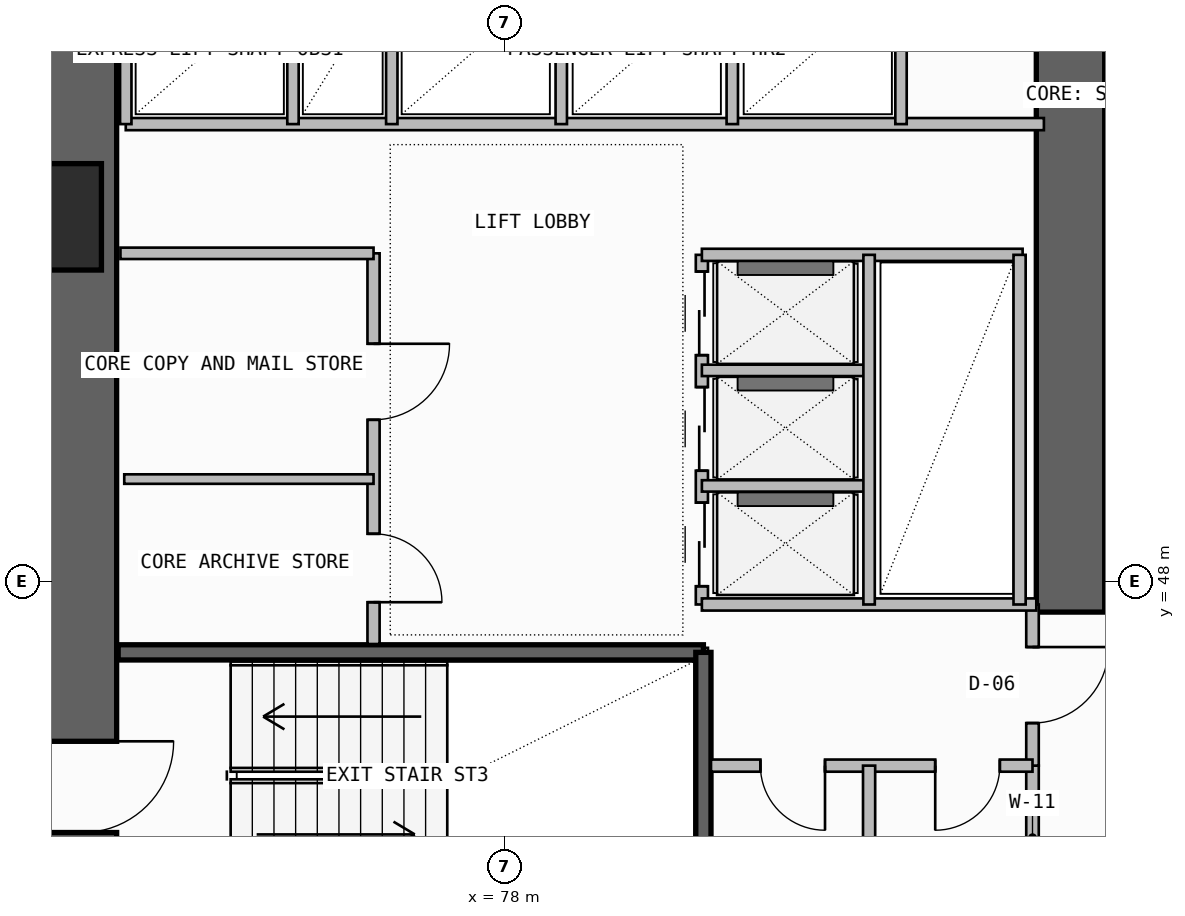
"""IFC4 building model, lengths in metres.
Left out: names, types, materials, properties, quantities, classifications, styles, units other than length and angle.
Written with IfcOpenShell. Run it as: python <this file> out.ifc"""

import sys

from ifc_helpers import new_model, si_unit, direction, frame, frame_2d, origin, origin_2d, place, context, subcontext, project, spatial, rectangle, extrude, element, fill, save


model = new_model("IFC4")
c1 = context("Model", 3, precision=1e-05, world=origin(), true_north=direction((0.0, 1.0)))
c2 = subcontext(c1, "Body", "Model", "MODEL_VIEW")
j1 = project(units=[si_unit("LENGTHUNIT", "METRE"), si_unit("PLANEANGLEUNIT", "RADIAN")], contexts=[c1])
p1 = place(None, origin())
s1 = spatial("IfcSite", under=j1, at=p1, CompositionType="ELEMENT")
p2 = place(p1, origin())
s2 = spatial("IfcBuilding", under=s1, at=p2, CompositionType="ELEMENT")
p3 = place(p2, frame((0.0, 0.0, 99.3)))
s3 = spatial("IfcBuildingStorey", under=s2, at=p3, CompositionType="ELEMENT", Elevation=99.3)
p4 = place(p3, frame((72.45, 43.35, -0.26), z_axis=(0.0, 0.0, 1.0), x_axis=(0.0, 1.0, 0.0)))
e1 = element("IfcWall", 1, at=p4, inside=s3, PredefinedType="SHEAR", context=c2, shape_type="SweptSolid", body=[
    extrude(rectangle(XDim=12.7, YDim=0.9, at=frame_2d((6.35, 0.0))), origin(), (0.0, 0.0, 1.0), 3.6),
])
p5 = place(p4, frame((1.35, 0.0, 0.26)))
e2 = element("IfcOpeningElement", 2, at=p5, cuts=e1, PredefinedType="OPENING", context=c2, shape_type="SweptSolid", body=[
    extrude(rectangle(XDim=1.2, YDim=2.2, at=frame_2d((0.6, 1.1))), frame((0.0, 0.46, 0.0), z_axis=(0.0, -1.0, 0.0), x_axis=(1.0, 0.0, 0.0)), (0.0, 0.0, 1.0), 0.92),
])
p6 = place(p3, frame((85.45, 47.6, -0.26), z_axis=(0.0, 0.0, 1.0), x_axis=(0.0, 1.0, 0.0)))
e3 = element("IfcWall", 3, at=p6, inside=s3, PredefinedType="SHEAR", context=c2, shape_type="SweptSolid", body=[
    extrude(rectangle(XDim=8.45, YDim=0.9, at=frame_2d((4.225, 0.0))), origin(), (0.0, 0.0, 1.0), 3.6),
])
p7 = place(p3, frame((72.0, 52.8, 0.0), z_axis=(0.0, 0.0, 1.0), x_axis=(1.0, 0.0, 0.0)))
e4 = element("IfcColumn", 4, at=p7, inside=s3, PredefinedType="COLUMN", context=c2, shape_type="SweptSolid", body=[
    extrude(rectangle(XDim=1.4, YDim=1.4, at=origin_2d()), origin(), (0.0, 0.0, 1.0), 3.6),
])
p8 = place(p3, frame((72.92, 47.07, -0.26), z_axis=(0.0, 0.0, 1.0), x_axis=(1.0, 0.0, 0.0)))
e5 = element("IfcWall", 5, at=p8, inside=s3, PredefinedType="SOLIDWALL", context=c2, shape_type="SweptSolid", body=[
    extrude(rectangle(XDim=7.7, YDim=0.2, at=frame_2d((3.85, 0.0))), origin(), (0.0, 0.0, 1.0), 3.6),
])
p9 = place(p3, frame((80.62, 43.83, -0.26), z_axis=(0.0, 0.0, 1.0), x_axis=(0.0, 1.0, 0.0)))
e6 = element("IfcWall", 6, at=p9, inside=s3, PredefinedType="SOLIDWALL", context=c2, shape_type="SweptSolid", body=[
    extrude(rectangle(XDim=3.24, YDim=0.2, at=frame_2d((1.62, 0.0))), origin(), (0.0, 0.0, 1.0), 3.6),
])
p10 = place(p3, frame((84.95, 43.68, 0.0), z_axis=(0.0, 0.0, 1.0), x_axis=(0.0, 1.0, 0.0)))
e7 = element("IfcWall", 7, at=p10, inside=s3, PredefinedType="PLUMBINGWALL", context=c2, shape_type="SweptSolid", body=[
    extrude(rectangle(XDim=1.9, YDim=0.165, at=frame_2d((0.95, 0.0))), origin(), (0.0, 0.0, 1.0), 3.34),
])
p11 = place(p3, frame((84.95, 45.58, 0.0), z_axis=(0.0, 0.0, 1.0), x_axis=(0.0, 1.0, 0.0)))
e8 = element("IfcWall", 8, at=p11, inside=s3, PredefinedType="PARTITIONING", context=c2, shape_type="SweptSolid", body=[
    extrude(rectangle(XDim=2.12, YDim=0.165, at=frame_2d((1.06, 0.0))), origin(), (0.0, 0.0, 1.0), 3.34),
])
p12 = place(p11, frame((0.56, 0.0, 0.0)))
e9 = element("IfcOpeningElement", 9, at=p12, cuts=e8, PredefinedType="OPENING", context=c2, shape_type="SweptSolid", body=[
    extrude(rectangle(XDim=1.0, YDim=2.2, at=frame_2d((0.5, 1.1))), frame((0.0, 0.093, 0.0), z_axis=(0.0, -1.0, 0.0), x_axis=(1.0, 0.0, 0.0)), (0.0, 0.0, 1.0), 0.185),
])
p13 = place(p3, frame((80.72, 45.58, 0.0), z_axis=(0.0, 0.0, 1.0), x_axis=(1.0, 0.0, 0.0)))
e10 = element("IfcWall", 10, at=p13, inside=s3, PredefinedType="PLUMBINGWALL", context=c2, shape_type="SweptSolid", body=[
    extrude(rectangle(XDim=4.23, YDim=0.16, at=frame_2d((2.115, 0.0))), origin(), (0.0, 0.0, 1.0), 3.34),
])
p14 = place(p13, frame((0.65, 0.0, 0.0)))
e11 = element("IfcOpeningElement", 11, at=p14, cuts=e10, PredefinedType="OPENING", context=c2, shape_type="SweptSolid", body=[
    extrude(rectangle(XDim=0.85, YDim=2.05, at=frame_2d((0.425, 1.025))), frame((0.0, 0.09, 0.0), z_axis=(0.0, -1.0, 0.0), x_axis=(1.0, 0.0, 0.0)), (0.0, 0.0, 1.0), 0.18),
])
p15 = place(p13, frame((2.95, 0.0, 0.0)))
e12 = element("IfcOpeningElement", 12, at=p15, cuts=e10, PredefinedType="OPENING", context=c2, shape_type="SweptSolid", body=[
    extrude(rectangle(XDim=0.85, YDim=2.05, at=frame_2d((0.425, 1.025))), frame((0.0, 0.09, 0.0), z_axis=(0.0, -1.0, 0.0), x_axis=(1.0, 0.0, 0.0)), (0.0, 0.0, 1.0), 0.18),
])
p16 = place(p3, frame((82.8, 43.68, 0.0), z_axis=(0.0, 0.0, 1.0), x_axis=(0.0, 1.0, 0.0)))
e13 = element("IfcWall", 13, at=p16, inside=s3, PredefinedType="PLUMBINGWALL", context=c2, shape_type="SweptSolid", body=[
    extrude(rectangle(XDim=1.9, YDim=0.16, at=frame_2d((0.95, 0.0))), origin(), (0.0, 0.0, 1.0), 3.34),
])
p17 = place(p3, frame((76.28, 47.18, 0.0), z_axis=(0.0, 0.0, 1.0), x_axis=(0.0, 1.0, 0.0)))
e14 = element("IfcWall", 14, at=p17, inside=s3, PredefinedType="SOLIDWALL", context=c2, shape_type="SweptSolid", body=[
    extrude(rectangle(XDim=5.14, YDim=0.16, at=frame_2d((2.57, 0.0))), origin(), (0.0, 0.0, 1.0), 3.34),
])
p18 = place(p17, frame((0.55, 0.0, 0.0)))
e15 = element("IfcOpeningElement", 15, at=p18, cuts=e14, PredefinedType="OPENING", context=c2, shape_type="SweptSolid", body=[
    extrude(rectangle(XDim=0.9, YDim=2.1, at=frame_2d((0.45, 1.05))), frame((0.0, 0.09, 0.0), z_axis=(0.0, -1.0, 0.0), x_axis=(1.0, 0.0, 0.0)), (0.0, 0.0, 1.0), 0.18),
])
p19 = place(p17, frame((2.95, 0.0, 0.0)))
e16 = element("IfcOpeningElement", 16, at=p19, cuts=e14, PredefinedType="OPENING", context=c2, shape_type="SweptSolid", body=[
    extrude(rectangle(XDim=1.0, YDim=2.2, at=frame_2d((0.5, 1.1))), frame((0.0, 0.09, 0.0), z_axis=(0.0, -1.0, 0.0), x_axis=(1.0, 0.0, 0.0)), (0.0, 0.0, 1.0), 0.18),
])
p20 = place(p3, frame((72.95, 52.32, 0.0), z_axis=(0.0, 0.0, 1.0), x_axis=(1.0, 0.0, 0.0)))
e17 = element("IfcWall", 17, at=p20, inside=s3, PredefinedType="SOLIDWALL", context=c2, shape_type="SweptSolid", body=[
    extrude(rectangle(XDim=3.33, YDim=0.15, at=frame_2d((1.665, 0.0))), origin(), (0.0, 0.0, 1.0), 3.34),
])
p21 = place(p3, frame((73.0, 49.35, 0.0), z_axis=(0.0, 0.0, 1.0), x_axis=(1.0, 0.0, 0.0)))
e18 = element("IfcWall", 18, at=p21, inside=s3, PredefinedType="PARTITIONING", context=c2, shape_type="SweptSolid", body=[
    extrude(rectangle(XDim=3.28, YDim=0.125, at=frame_2d((1.64, 0.0))), origin(), (0.0, 0.0, 1.0), 3.34),
])
p22 = place(p3, frame((80.6, 47.7, 0.0), z_axis=(0.0, 0.0, 1.0), x_axis=(0.0, 1.0, 0.0)))
e19 = element("IfcWall", 19, at=p22, inside=s3, PredefinedType="SOLIDWALL", context=c2, shape_type="SweptSolid", body=[
    extrude(rectangle(XDim=4.6, YDim=0.16, at=frame_2d((2.3, 0.0))), origin(), (0.0, 0.0, 1.0), 3.34),
])
p23 = place(p22, frame((0.24, 0.0, 0.0)))
e20 = element("IfcOpeningElement", 20, at=p23, cuts=e19, PredefinedType="OPENING", context=c2, shape_type="SweptSolid", body=[
    extrude(rectangle(XDim=1.1, YDim=2.25, at=frame_2d((0.55, 1.125))), frame((0.0, 0.09, 0.0), z_axis=(0.0, -1.0, 0.0), x_axis=(1.0, 0.0, 0.0)), (0.0, 0.0, 1.0), 0.18),
])
p24 = place(p22, frame((1.76, 0.0, 0.0)))
e21 = element("IfcOpeningElement", 21, at=p24, cuts=e19, PredefinedType="OPENING", context=c2, shape_type="SweptSolid", body=[
    extrude(rectangle(XDim=1.1, YDim=2.25, at=frame_2d((0.55, 1.125))), frame((0.0, 0.09, 0.0), z_axis=(0.0, -1.0, 0.0), x_axis=(1.0, 0.0, 0.0)), (0.0, 0.0, 1.0), 0.18),
])
p25 = place(p22, frame((3.28, 0.0, 0.0)))
e22 = element("IfcOpeningElement", 22, at=p25, cuts=e19, PredefinedType="OPENING", context=c2, shape_type="SweptSolid", body=[
    extrude(rectangle(XDim=1.1, YDim=2.25, at=frame_2d((0.55, 1.125))), frame((0.0, 0.09, 0.0), z_axis=(0.0, -1.0, 0.0), x_axis=(1.0, 0.0, 0.0)), (0.0, 0.0, 1.0), 0.18),
])
p26 = place(p3, frame((80.6, 47.7, 0.0), z_axis=(0.0, 0.0, 1.0), x_axis=(1.0, 0.0, 0.0)))
e23 = element("IfcWall", 23, at=p26, inside=s3, PredefinedType="SOLIDWALL", context=c2, shape_type="SweptSolid", body=[
    extrude(rectangle(XDim=4.4, YDim=0.16, at=frame_2d((2.2, 0.0))), origin(), (0.0, 0.0, 1.0), 3.34),
])
p27 = place(p3, frame((80.6, 52.3, 0.0), z_axis=(0.0, 0.0, 1.0), x_axis=(1.0, 0.0, 0.0)))
e24 = element("IfcWall", 24, at=p27, inside=s3, PredefinedType="SOLIDWALL", context=c2, shape_type="SweptSolid", body=[
    extrude(rectangle(XDim=4.22, YDim=0.16, at=frame_2d((2.11, 0.0))), origin(), (0.0, 0.0, 1.0), 3.34),
])
for number, where, z_axis, x_axis in (
    (25, (80.6, 49.26, 0.0), (0.0, 0.0, 1.0), (1.0, 0.0, 0.0)),
    (26, (80.6, 50.78, 0.0), (0.0, 0.0, 1.0), (1.0, 0.0, 0.0)),
):
    element("IfcWall", number, at=place(p3, frame(where, z_axis=z_axis, x_axis=x_axis)), inside=s3, PredefinedType="PLUMBINGWALL", context=c2, shape_type="SweptSolid", body=[
        extrude(rectangle(XDim=2.2, YDim=0.15, at=frame_2d((1.1, 0.0))), origin(), (0.0, 0.0, 1.0), 3.34),
    ])
p28 = place(p3, frame((82.8, 47.7, 0.0), z_axis=(0.0, 0.0, 1.0), x_axis=(0.0, 1.0, 0.0)))
e27 = element("IfcWall", 27, at=p28, inside=s3, PredefinedType="PLUMBINGWALL", context=c2, shape_type="SweptSolid", body=[
    extrude(rectangle(XDim=4.6, YDim=0.15, at=frame_2d((2.3, 0.0))), origin(), (0.0, 0.0, 1.0), 3.34),
])
p29 = place(p3, frame((84.78, 47.7, 0.0), z_axis=(0.0, 0.0, 1.0), x_axis=(0.0, 1.0, 0.0)))
e28 = element("IfcWall", 28, at=p29, inside=s3, PredefinedType="SOLIDWALL", context=c2, shape_type="SweptSolid", body=[
    extrude(rectangle(XDim=4.6, YDim=0.16, at=frame_2d((2.3, 0.0))), origin(), (0.0, 0.0, 1.0), 3.34),
])
p30 = place(p3, frame((73.02, 54.02, 0.0), z_axis=(0.0, 0.0, 1.0), x_axis=(1.0, 0.0, 0.0)))
e29 = element("IfcWall", 29, at=p30, inside=s3, PredefinedType="SOLIDWALL", context=c2, shape_type="SweptSolid", body=[
    extrude(rectangle(XDim=12.08, YDim=0.16, at=frame_2d((6.04, 0.0))), origin(), (0.0, 0.0, 1.0), 3.34),
])
p31 = place(p3, frame((73.02, 54.02, 0.0), z_axis=(0.0, 0.0, 1.0), x_axis=(0.0, 1.0, 0.0)))
e30 = element("IfcWall", 30, at=p31, inside=s3, PredefinedType="PLUMBINGWALL", context=c2, shape_type="SweptSolid", body=[
    extrude(rectangle(XDim=1.94, YDim=0.15, at=frame_2d((0.97, 0.0))), origin(), (0.0, 0.0, 1.0), 3.34),
])
p32 = place(p3, frame((76.52, 54.02, 0.0), z_axis=(0.0, 0.0, 1.0), x_axis=(0.0, 1.0, 0.0)))
e31 = element("IfcWall", 31, at=p32, inside=s3, PredefinedType="SOLIDWALL", context=c2, shape_type="SweptSolid", body=[
    extrude(rectangle(XDim=1.94, YDim=0.15, at=frame_2d((0.97, 0.0))), origin(), (0.0, 0.0, 1.0), 3.34),
])
p33 = place(p3, frame((75.22, 54.02, 0.0), z_axis=(0.0, 0.0, 1.0), x_axis=(0.0, 1.0, 0.0)))
e32 = element("IfcWall", 32, at=p33, inside=s3, PredefinedType="PLUMBINGWALL", context=c2, shape_type="SweptSolid", body=[
    extrude(rectangle(XDim=1.94, YDim=0.15, at=frame_2d((0.97, 0.0))), origin(), (0.0, 0.0, 1.0), 3.34),
])
for number, where, z_axis, x_axis in (
    (33, (78.75, 54.02, 0.0), (0.0, 0.0, 1.0), (0.0, 1.0, 0.0)),
    (34, (81.0, 54.02, 0.0), (0.0, 0.0, 1.0), (0.0, 1.0, 0.0)),
):
    element("IfcWall", number, at=place(p3, frame(where, z_axis=z_axis, x_axis=x_axis)), inside=s3, PredefinedType="PLUMBINGWALL", context=c2, shape_type="SweptSolid", body=[
        extrude(rectangle(XDim=1.96, YDim=0.15, at=frame_2d((0.98, 0.0))), origin(), (0.0, 0.0, 1.0), 3.34),
    ])
p34 = place(p3, frame((83.22, 54.02, 0.0), z_axis=(0.0, 0.0, 1.0), x_axis=(0.0, 1.0, 0.0)))
e35 = element("IfcWall", 35, at=p34, inside=s3, PredefinedType="SOLIDWALL", context=c2, shape_type="SweptSolid", body=[
    extrude(rectangle(XDim=1.96, YDim=0.15, at=frame_2d((0.98, 0.0))), origin(), (0.0, 0.0, 1.0), 3.34),
])
p35 = place(p5, frame((1.2, 0.0, 0.0), z_axis=(0.0, 0.0, 1.0), x_axis=(-1.0, 0.0, 0.0)))
e36 = element("IfcDoor", 36, at=p35, inside=s3, OperationType="SINGLE_SWING_LEFT", PredefinedType="USERDEFINED", context=c2, shape_type="SweptSolid", body=[
    extrude(rectangle(XDim=1.2, YDim=2.2, at=frame_2d((0.6, 1.1))), frame((0.0, 0.025, 0.0), z_axis=(0.0, -1.0, 0.0), x_axis=(1.0, 0.0, 0.0)), (0.0, 0.0, 1.0), 0.05),
])
fill(e2, e36)
p36 = place(p12, frame((1.0, 0.0, 0.0), z_axis=(0.0, 0.0, 1.0), x_axis=(-1.0, 0.0, 0.0)))
e37 = element("IfcDoor", 37, at=p36, inside=s3, OperationType="SINGLE_SWING_LEFT", PredefinedType="DOOR", context=c2, shape_type="SweptSolid", body=[
    extrude(rectangle(XDim=1.0, YDim=2.2, at=frame_2d((0.5, 1.1))), frame((0.0, 0.025, 0.0), z_axis=(0.0, -1.0, 0.0), x_axis=(1.0, 0.0, 0.0)), (0.0, 0.0, 1.0), 0.05),
])
fill(e9, e37)
p37 = place(p14, frame((0.85, 0.0, 0.0), z_axis=(0.0, 0.0, 1.0), x_axis=(-1.0, 0.0, 0.0)))
e38 = element("IfcDoor", 38, at=p37, inside=s3, OperationType="SINGLE_SWING_LEFT", PredefinedType="DOOR", context=c2, shape_type="SweptSolid", body=[
    extrude(rectangle(XDim=0.85, YDim=2.05, at=frame_2d((0.425, 1.025))), frame((0.0, 0.025, 0.0), z_axis=(0.0, -1.0, 0.0), x_axis=(1.0, 0.0, 0.0)), (0.0, 0.0, 1.0), 0.05),
])
fill(e11, e38)
p38 = place(p15, frame((0.85, 0.0, 0.0), z_axis=(0.0, 0.0, 1.0), x_axis=(-1.0, 0.0, 0.0)))
e39 = element("IfcDoor", 39, at=p38, inside=s3, OperationType="SINGLE_SWING_RIGHT", PredefinedType="DOOR", context=c2, shape_type="SweptSolid", body=[
    extrude(rectangle(XDim=0.85, YDim=2.05, at=frame_2d((0.425, 1.025))), frame((0.0, 0.025, 0.0), z_axis=(0.0, -1.0, 0.0), x_axis=(1.0, 0.0, 0.0)), (0.0, 0.0, 1.0), 0.05),
])
fill(e12, e39)
p39 = place(p18, frame((0.9, 0.0, 0.0), z_axis=(0.0, 0.0, 1.0), x_axis=(-1.0, 0.0, 0.0)))
e40 = element("IfcDoor", 40, at=p39, inside=s3, OperationType="SINGLE_SWING_RIGHT", PredefinedType="DOOR", context=c2, shape_type="SweptSolid", body=[
    extrude(rectangle(XDim=0.9, YDim=2.1, at=frame_2d((0.45, 1.05))), frame((0.0, 0.025, 0.0), z_axis=(0.0, -1.0, 0.0), x_axis=(1.0, 0.0, 0.0)), (0.0, 0.0, 1.0), 0.05),
])
fill(e15, e40)
p40 = place(p19, frame((1.0, 0.0, 0.0), z_axis=(0.0, 0.0, 1.0), x_axis=(-1.0, 0.0, 0.0)))
e41 = element("IfcDoor", 41, at=p40, inside=s3, OperationType="SINGLE_SWING_LEFT", PredefinedType="DOOR", context=c2, shape_type="SweptSolid", body=[
    extrude(rectangle(XDim=1.0, YDim=2.2, at=frame_2d((0.5, 1.1))), frame((0.0, 0.025, 0.0), z_axis=(0.0, -1.0, 0.0), x_axis=(1.0, 0.0, 0.0)), (0.0, 0.0, 1.0), 0.05),
])
fill(e16, e41)
p41 = place(p23, frame((1.1, 0.0, 0.0), z_axis=(0.0, 0.0, 1.0), x_axis=(-1.0, 0.0, 0.0)))
e42 = element("IfcDoor", 42, at=p41, inside=s3, OperationType="DOUBLE_DOOR_SLIDING", PredefinedType="DOOR", context=c2, shape_type="SweptSolid", body=[
    extrude(rectangle(XDim=1.1, YDim=2.25, at=frame_2d((0.55, 1.125))), frame((0.0, 0.025, 0.0), z_axis=(0.0, -1.0, 0.0), x_axis=(1.0, 0.0, 0.0)), (0.0, 0.0, 1.0), 0.05),
])
fill(e20, e42)
p42 = place(p24, frame((1.1, 0.0, 0.0), z_axis=(0.0, 0.0, 1.0), x_axis=(-1.0, 0.0, 0.0)))
e43 = element("IfcDoor", 43, at=p42, inside=s3, OperationType="DOUBLE_DOOR_SLIDING", PredefinedType="DOOR", context=c2, shape_type="SweptSolid", body=[
    extrude(rectangle(XDim=1.1, YDim=2.25, at=frame_2d((0.55, 1.125))), frame((0.0, 0.025, 0.0), z_axis=(0.0, -1.0, 0.0), x_axis=(1.0, 0.0, 0.0)), (0.0, 0.0, 1.0), 0.05),
])
fill(e21, e43)
p43 = place(p25, frame((1.1, 0.0, 0.0), z_axis=(0.0, 0.0, 1.0), x_axis=(-1.0, 0.0, 0.0)))
e44 = element("IfcDoor", 44, at=p43, inside=s3, OperationType="DOUBLE_DOOR_SLIDING", PredefinedType="DOOR", context=c2, shape_type="SweptSolid", body=[
    extrude(rectangle(XDim=1.1, YDim=2.25, at=frame_2d((0.55, 1.125))), frame((0.0, 0.025, 0.0), z_axis=(0.0, -1.0, 0.0), x_axis=(1.0, 0.0, 0.0)), (0.0, 0.0, 1.0), 0.05),
])
fill(e22, e44)
save(model, sys.argv[1])
